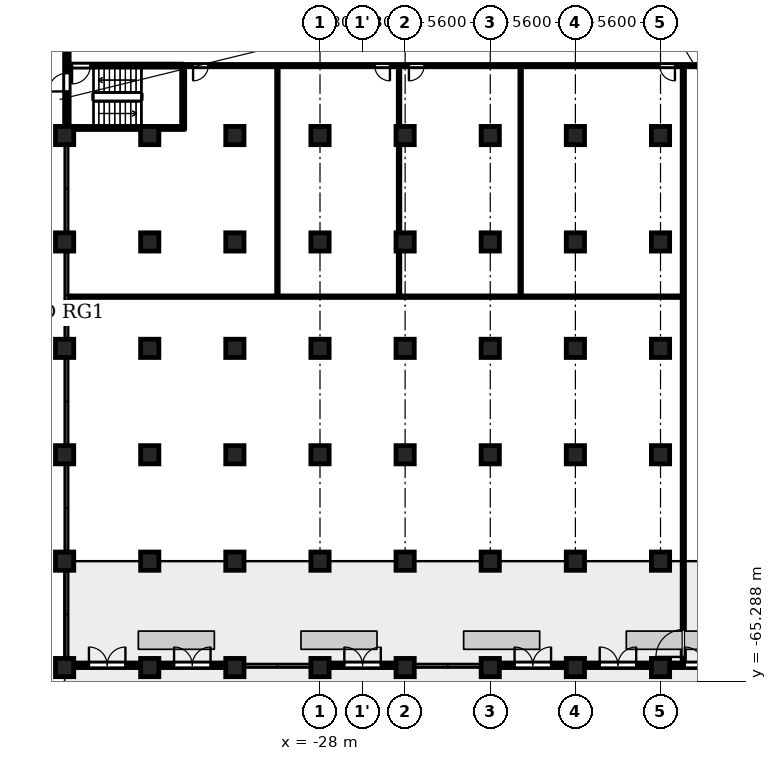
"""IFC4 building model, lengths in metres.
Left out: names, types, materials, properties, quantities, classifications, styles, units other than length and angle.
Written with IfcOpenShell. Run it as: python <this file> out.ifc"""

import sys

from ifc_helpers import new_model, si_unit, direction, frame, frame_2d, origin, origin_2d, place, context, subcontext, project, spatial, rectangle, circle, extrude, element, fill, save


model = new_model("IFC4")
c1 = context("Model", 3, precision=1e-05, world=origin(), true_north=direction((0.0, 1.0)))
c2 = subcontext(c1, "Body", "Model", "MODEL_VIEW")
j1 = project(units=[si_unit("LENGTHUNIT", "METRE"), si_unit("PLANEANGLEUNIT", "RADIAN")], contexts=[c1])
p1 = place(None, origin())
s1 = spatial("IfcSite", under=j1, at=p1, CompositionType="ELEMENT")
p2 = place(p1, origin())
s2 = spatial("IfcBuilding", under=s1, at=p2, CompositionType="ELEMENT")
p3 = place(p2, origin())
s3 = spatial("IfcBuildingStorey", under=s2, at=p3, CompositionType="ELEMENT", Elevation=0.0)
for number, where, z_axis, x_axis in (
    (1, (-44.8, -29.4, 0.0), (0.0, 0.0, 1.0), (1.0, 0.0, 0.0)),
    (2, (-39.2, -29.4, 0.0), (0.0, 0.0, 1.0), (1.0, 0.0, 0.0)),
    (3, (-33.6, -29.4, 0.0), (0.0, 0.0, 1.0), (1.0, 0.0, 0.0)),
    (4, (-28.0, -29.4, 0.0), (0.0, 0.0, 1.0), (1.0, 0.0, 0.0)),
    (5, (-22.4, -29.4, 0.0), (0.0, 0.0, 1.0), (1.0, 0.0, 0.0)),
    (6, (-16.8, -29.4, 0.0), (0.0, 0.0, 1.0), (1.0, 0.0, 0.0)),
    (7, (-11.2, -29.4, 0.0), (0.0, 0.0, 1.0), (1.0, 0.0, 0.0)),
    (8, (-5.6, -29.4, 0.0), (0.0, 0.0, 1.0), (1.0, 0.0, 0.0)),
    (9, (-44.8, -36.4, 0.0), (0.0, 0.0, 1.0), (1.0, 0.0, 0.0)),
    (10, (-39.2, -36.4, 0.0), (0.0, 0.0, 1.0), (1.0, 0.0, 0.0)),
    (11, (-33.6, -36.4, 0.0), (0.0, 0.0, 1.0), (1.0, 0.0, 0.0)),
    (12, (-28.0, -36.4, 0.0), (0.0, 0.0, 1.0), (1.0, 0.0, 0.0)),
    (13, (-22.4, -36.4, 0.0), (0.0, 0.0, 1.0), (1.0, 0.0, 0.0)),
    (14, (-16.8, -36.4, 0.0), (0.0, 0.0, 1.0), (1.0, 0.0, 0.0)),
    (15, (-11.2, -36.4, 0.0), (0.0, 0.0, 1.0), (1.0, 0.0, 0.0)),
    (16, (-5.6, -36.4, 0.0), (0.0, 0.0, 1.0), (1.0, 0.0, 0.0)),
    (17, (-44.8, -43.4, 0.0), (0.0, 0.0, 1.0), (1.0, 0.0, 0.0)),
    (18, (-39.2, -43.4, 0.0), (0.0, 0.0, 1.0), (1.0, 0.0, 0.0)),
    (19, (-33.6, -43.4, 0.0), (0.0, 0.0, 1.0), (1.0, 0.0, 0.0)),
    (20, (-28.0, -43.4, 0.0), (0.0, 0.0, 1.0), (1.0, 0.0, 0.0)),
    (21, (-22.4, -43.4, 0.0), (0.0, 0.0, 1.0), (1.0, 0.0, 0.0)),
    (22, (-16.8, -43.4, 0.0), (0.0, 0.0, 1.0), (1.0, 0.0, 0.0)),
    (23, (-11.2, -43.4, 0.0), (0.0, 0.0, 1.0), (1.0, 0.0, 0.0)),
    (24, (-5.6, -43.4, 0.0), (0.0, 0.0, 1.0), (1.0, 0.0, 0.0)),
    (25, (-44.8, -50.4, 0.0), (0.0, 0.0, 1.0), (1.0, 0.0, 0.0)),
    (26, (-39.2, -50.4, 0.0), (0.0, 0.0, 1.0), (1.0, 0.0, 0.0)),
    (27, (-33.6, -50.4, 0.0), (0.0, 0.0, 1.0), (1.0, 0.0, 0.0)),
    (28, (-28.0, -50.4, 0.0), (0.0, 0.0, 1.0), (1.0, 0.0, 0.0)),
    (29, (-22.4, -50.4, 0.0), (0.0, 0.0, 1.0), (1.0, 0.0, 0.0)),
    (30, (-16.8, -50.4, 0.0), (0.0, 0.0, 1.0), (1.0, 0.0, 0.0)),
    (31, (-11.2, -50.4, 0.0), (0.0, 0.0, 1.0), (1.0, 0.0, 0.0)),
    (32, (-5.6, -50.4, 0.0), (0.0, 0.0, 1.0), (1.0, 0.0, 0.0)),
    (33, (-44.8, -57.4, 0.0), (0.0, 0.0, 1.0), (1.0, 0.0, 0.0)),
    (34, (-39.2, -57.4, 0.0), (0.0, 0.0, 1.0), (1.0, 0.0, 0.0)),
    (35, (-33.6, -57.4, 0.0), (0.0, 0.0, 1.0), (1.0, 0.0, 0.0)),
    (36, (-28.0, -57.4, 0.0), (0.0, 0.0, 1.0), (1.0, 0.0, 0.0)),
    (37, (-22.4, -57.4, 0.0), (0.0, 0.0, 1.0), (1.0, 0.0, 0.0)),
    (38, (-16.8, -57.4, 0.0), (0.0, 0.0, 1.0), (1.0, 0.0, 0.0)),
    (39, (-11.2, -57.4, 0.0), (0.0, 0.0, 1.0), (1.0, 0.0, 0.0)),
    (40, (-5.6, -57.4, 0.0), (0.0, 0.0, 1.0), (1.0, 0.0, 0.0)),
    (41, (-44.8, -64.4, 0.0), (0.0, 0.0, 1.0), (1.0, 0.0, 0.0)),
    (42, (-39.2, -64.4, 0.0), (0.0, 0.0, 1.0), (1.0, 0.0, 0.0)),
    (43, (-33.6, -64.4, 0.0), (0.0, 0.0, 1.0), (1.0, 0.0, 0.0)),
    (44, (-28.0, -64.4, 0.0), (0.0, 0.0, 1.0), (1.0, 0.0, 0.0)),
    (45, (-22.4, -64.4, 0.0), (0.0, 0.0, 1.0), (1.0, 0.0, 0.0)),
    (46, (-16.8, -64.4, 0.0), (0.0, 0.0, 1.0), (1.0, 0.0, 0.0)),
    (47, (-11.2, -64.4, 0.0), (0.0, 0.0, 1.0), (1.0, 0.0, 0.0)),
    (48, (-5.6, -64.4, 0.0), (0.0, 0.0, 1.0), (1.0, 0.0, 0.0)),
):
    element("IfcColumn", number, at=place(p3, frame(where, z_axis=z_axis, x_axis=x_axis)), inside=s3, PredefinedType="COLUMN", context=c2, shape_type="SweptSolid", body=[
        extrude(circle(Radius=0.6, at=origin_2d()), origin(), (0.0, 0.0, 1.0), 6.5),
    ])
p4 = place(p3, frame((-44.65, -28.8, 0.0), z_axis=(0.0, 0.0, 1.0), x_axis=(0.0, 1.0, 0.0)))
e49 = element("IfcWall", 49, at=p4, inside=s3, PredefinedType="SOLIDWALL", context=c2, shape_type="SweptSolid", body=[
    extrude(rectangle(XDim=5.8, YDim=0.3, at=frame_2d((2.9, 0.0))), origin(), (0.0, 0.0, 1.0), 5.35),
])
p5 = place(p4, frame((2.3, 0.0, 0.0)))
e50 = element("IfcOpeningElement", 50, at=p5, cuts=e49, PredefinedType="OPENING", context=c2, shape_type="SweptSolid", body=[
    extrude(rectangle(XDim=1.2, YDim=2.1, at=frame_2d((0.6, 1.05))), frame((0.0, 0.16, 0.0), z_axis=(0.0, -1.0, 0.0), x_axis=(1.0, 0.0, 0.0)), (0.0, 0.0, 1.0), 0.32),
])
p6 = place(p3, frame((-44.2, -64.25, 0.0), z_axis=(0.0, 0.0, 1.0), x_axis=(1.0, 0.0, 0.0)))
e51 = element("IfcWall", 51, at=p6, inside=s3, PredefinedType="SOLIDWALL", context=c2, shape_type="SweptSolid", body=[
    extrude(rectangle(XDim=4.4, YDim=0.3, at=frame_2d((2.2, 0.0))), origin(), (0.0, 0.0, 1.0), 5.35),
])
p7 = place(p6, frame((1.0, 0.0, 0.0)))
e52 = element("IfcOpeningElement", 52, at=p7, cuts=e51, PredefinedType="OPENING", context=c2, shape_type="SweptSolid", body=[
    extrude(rectangle(XDim=2.4, YDim=2.4, at=frame_2d((1.2, 1.2))), frame((0.0, 0.16, 0.0), z_axis=(0.0, -1.0, 0.0), x_axis=(1.0, 0.0, 0.0)), (0.0, 0.0, 1.0), 0.32),
])
p8 = place(p3, frame((-38.6, -64.25, 0.0), z_axis=(0.0, 0.0, 1.0), x_axis=(1.0, 0.0, 0.0)))
e53 = element("IfcWall", 53, at=p8, inside=s3, PredefinedType="SOLIDWALL", context=c2, shape_type="SweptSolid", body=[
    extrude(rectangle(XDim=4.4, YDim=0.3, at=frame_2d((2.2, 0.0))), origin(), (0.0, 0.0, 1.0), 5.35),
])
p9 = place(p8, frame((1.0, 0.0, 0.0)))
e54 = element("IfcOpeningElement", 54, at=p9, cuts=e53, PredefinedType="OPENING", context=c2, shape_type="SweptSolid", body=[
    extrude(rectangle(XDim=2.4, YDim=2.4, at=frame_2d((1.2, 1.2))), frame((0.0, 0.16, 0.0), z_axis=(0.0, -1.0, 0.0), x_axis=(1.0, 0.0, 0.0)), (0.0, 0.0, 1.0), 0.32),
])
p10 = place(p3, frame((-27.4, -64.25, 0.0), z_axis=(0.0, 0.0, 1.0), x_axis=(1.0, 0.0, 0.0)))
e55 = element("IfcWall", 55, at=p10, inside=s3, PredefinedType="SOLIDWALL", context=c2, shape_type="SweptSolid", body=[
    extrude(rectangle(XDim=4.4, YDim=0.3, at=frame_2d((2.2, 0.0))), origin(), (0.0, 0.0, 1.0), 5.35),
])
p11 = place(p10, frame((1.0, 0.0, 0.0)))
e56 = element("IfcOpeningElement", 56, at=p11, cuts=e55, PredefinedType="OPENING", context=c2, shape_type="SweptSolid", body=[
    extrude(rectangle(XDim=2.4, YDim=2.4, at=frame_2d((1.2, 1.2))), frame((0.0, 0.16, 0.0), z_axis=(0.0, -1.0, 0.0), x_axis=(1.0, 0.0, 0.0)), (0.0, 0.0, 1.0), 0.32),
])
p12 = place(p3, frame((-16.2, -64.25, 0.0), z_axis=(0.0, 0.0, 1.0), x_axis=(1.0, 0.0, 0.0)))
e57 = element("IfcWall", 57, at=p12, inside=s3, PredefinedType="SOLIDWALL", context=c2, shape_type="SweptSolid", body=[
    extrude(rectangle(XDim=4.4, YDim=0.3, at=frame_2d((2.2, 0.0))), origin(), (0.0, 0.0, 1.0), 5.35),
])
p13 = place(p12, frame((1.0, 0.0, 0.0)))
e58 = element("IfcOpeningElement", 58, at=p13, cuts=e57, PredefinedType="OPENING", context=c2, shape_type="SweptSolid", body=[
    extrude(rectangle(XDim=2.4, YDim=2.4, at=frame_2d((1.2, 1.2))), frame((0.0, 0.16, 0.0), z_axis=(0.0, -1.0, 0.0), x_axis=(1.0, 0.0, 0.0)), (0.0, 0.0, 1.0), 0.32),
])
p14 = place(p3, frame((-10.6, -64.25, 0.0), z_axis=(0.0, 0.0, 1.0), x_axis=(1.0, 0.0, 0.0)))
e59 = element("IfcWall", 59, at=p14, inside=s3, PredefinedType="SOLIDWALL", context=c2, shape_type="SweptSolid", body=[
    extrude(rectangle(XDim=4.4, YDim=0.3, at=frame_2d((2.2, 0.0))), origin(), (0.0, 0.0, 1.0), 5.35),
])
p15 = place(p14, frame((1.0, 0.0, 0.0)))
e60 = element("IfcOpeningElement", 60, at=p15, cuts=e59, PredefinedType="OPENING", context=c2, shape_type="SweptSolid", body=[
    extrude(rectangle(XDim=2.4, YDim=2.4, at=frame_2d((1.2, 1.2))), frame((0.0, 0.16, 0.0), z_axis=(0.0, -1.0, 0.0), x_axis=(1.0, 0.0, 0.0)), (0.0, 0.0, 1.0), 0.32),
])
p16 = place(p3, frame((-5.0, -64.25, 0.0), z_axis=(0.0, 0.0, 1.0), x_axis=(1.0, 0.0, 0.0)))
e61 = element("IfcWall", 61, at=p16, inside=s3, PredefinedType="SOLIDWALL", context=c2, shape_type="SweptSolid", body=[
    extrude(rectangle(XDim=4.4, YDim=0.3, at=frame_2d((2.2, 0.0))), origin(), (0.0, 0.0, 1.0), 5.35),
])
p17 = place(p16, frame((1.0, 0.0, 0.0)))
e62 = element("IfcOpeningElement", 62, at=p17, cuts=e61, PredefinedType="OPENING", context=c2, shape_type="SweptSolid", body=[
    extrude(rectangle(XDim=2.4, YDim=2.4, at=frame_2d((1.2, 1.2))), frame((0.0, 0.16, 0.0), z_axis=(0.0, -1.0, 0.0), x_axis=(1.0, 0.0, 0.0)), (0.0, 0.0, 1.0), 0.32),
])
p18 = place(p3, frame((-44.618, -40.0, 0.0), z_axis=(0.0, 0.0, 1.0), x_axis=(1.0, 0.0, 0.0)))
e63 = element("IfcWall", 63, at=p18, inside=s3, PredefinedType="PARTITIONING", context=c2, shape_type="SweptSolid", body=[
    extrude(rectangle(XDim=40.443, YDim=0.1, at=frame_2d((20.221, 0.0))), origin(), (0.0, 0.0, 1.0), 6.15),
])
p19 = place(p3, frame((-44.71, -28.9, 0.0), z_axis=(0.0, 0.0, 1.0), x_axis=(1.0, 0.0, 0.0)))
e64 = element("IfcWall", 64, at=p19, inside=s3, PredefinedType="SHEAR", context=c2, shape_type="SweptSolid", body=[
    extrude(rectangle(XDim=7.81, YDim=0.2, at=frame_2d((3.905, 0.0))), origin(), (0.0, 0.0, 1.0), 6.15),
])
p20 = place(p3, frame((-37.0, -24.8, 0.0), z_axis=(0.0, 0.0, 1.0), x_axis=(1.0, 0.0, 0.0)))
e65 = element("IfcWall", 65, at=p20, inside=s3, PredefinedType="PARTITIONING", context=c2, shape_type="SweptSolid", body=[
    extrude(rectangle(XDim=34.95, YDim=0.15, at=frame_2d((17.475, 0.0))), origin(), (0.0, 0.0, 1.0), 6.15),
])
p21 = place(p20, frame((0.65, 0.0, 0.0)))
e66 = element("IfcOpeningElement", 66, at=p21, cuts=e65, PredefinedType="OPENING", context=c2, shape_type="SweptSolid", body=[
    extrude(rectangle(XDim=1.0, YDim=2.1, at=frame_2d((0.5, 1.05))), frame((0.0, 0.085, 0.0), z_axis=(0.0, -1.0, 0.0), x_axis=(1.0, 0.0, 0.0)), (0.0, 0.0, 1.0), 0.17),
])
p22 = place(p20, frame((12.6, 0.0, 0.0)))
e67 = element("IfcOpeningElement", 67, at=p22, cuts=e65, PredefinedType="OPENING", context=c2, shape_type="SweptSolid", body=[
    extrude(rectangle(XDim=1.0, YDim=2.1, at=frame_2d((0.5, 1.05))), frame((0.0, 0.085, 0.0), z_axis=(0.0, -1.0, 0.0), x_axis=(1.0, 0.0, 0.0)), (0.0, 0.0, 1.0), 0.17),
])
p23 = place(p20, frame((14.85, 0.0, 0.0)))
e68 = element("IfcOpeningElement", 68, at=p23, cuts=e65, PredefinedType="OPENING", context=c2, shape_type="SweptSolid", body=[
    extrude(rectangle(XDim=1.0, YDim=2.1, at=frame_2d((0.5, 1.05))), frame((0.0, 0.085, 0.0), z_axis=(0.0, -1.0, 0.0), x_axis=(1.0, 0.0, 0.0)), (0.0, 0.0, 1.0), 0.17),
])
p24 = place(p20, frame((31.35, 0.0, 0.0)))
e69 = element("IfcOpeningElement", 69, at=p24, cuts=e65, PredefinedType="OPENING", context=c2, shape_type="SweptSolid", body=[
    extrude(rectangle(XDim=1.0, YDim=2.1, at=frame_2d((0.5, 1.05))), frame((0.0, 0.085, 0.0), z_axis=(0.0, -1.0, 0.0), x_axis=(1.0, 0.0, 0.0)), (0.0, 0.0, 1.0), 0.17),
])
p25 = place(p3, frame((-44.71, -24.8, 0.0), z_axis=(0.0, 0.0, 1.0), x_axis=(1.0, 0.0, 0.0)))
e70 = element("IfcWall", 70, at=p25, inside=s3, PredefinedType="SHEAR", context=c2, shape_type="SweptSolid", body=[
    extrude(rectangle(XDim=7.71, YDim=0.2, at=frame_2d((3.855, 0.0))), origin(), (0.0, 0.0, 1.0), 6.15),
])
p26 = place(p25, frame((0.4, 0.0, 0.0)))
e71 = element("IfcOpeningElement", 71, at=p26, cuts=e70, PredefinedType="OPENING", context=c2, shape_type="SweptSolid", body=[
    extrude(rectangle(XDim=1.2, YDim=2.1, at=frame_2d((0.6, 1.05))), frame((0.0, 0.11, 0.0), z_axis=(0.0, -1.0, 0.0), x_axis=(1.0, 0.0, 0.0)), (0.0, 0.0, 1.0), 0.22),
])
p27 = place(p3, frame((-37.0, -28.8, 0.0), z_axis=(0.0, 0.0, 1.0), x_axis=(0.0, 1.0, 0.0)))
e72 = element("IfcWall", 72, at=p27, inside=s3, PredefinedType="SHEAR", context=c2, shape_type="SweptSolid", body=[
    extrude(rectangle(XDim=3.925, YDim=0.2, at=frame_2d((1.962, 0.0))), origin(), (0.0, 0.0, 1.0), 6.15),
])
for number, where, z_axis, x_axis in (
    (73, (-30.8, -39.95, 0.0), (0.0, 0.0, 1.0), (0.0, 1.0, 0.0)),
    (74, (-22.8, -39.95, 0.0), (0.0, 0.0, 1.0), (0.0, 1.0, 0.0)),
    (75, (-14.8, -39.95, 0.0), (0.0, 0.0, 1.0), (0.0, 1.0, 0.0)),
):
    element("IfcWall", number, at=place(p3, frame(where, z_axis=z_axis, x_axis=x_axis)), inside=s3, PredefinedType="PARTITIONING", context=c2, shape_type="SweptSolid", body=[
        extrude(rectangle(XDim=15.075, YDim=0.1, at=frame_2d((7.538, 0.0))), origin(), (0.0, 0.0, 1.0), 6.15),
    ])
p28 = place(p3, frame((-4.1, -64.08, 0.0), z_axis=(0.0, 0.0, 1.0), x_axis=(0.0, 1.0, 0.0)))
e76 = element("IfcWall", 76, at=p28, inside=s3, PredefinedType="PARTITIONING", context=c2, shape_type="SweptSolid", body=[
    extrude(rectangle(XDim=39.205, YDim=0.15, at=frame_2d((19.603, 0.0))), origin(), (0.0, 0.0, 1.0), 6.15),
])
p29 = place(p28, frame((0.38, 0.0, 0.0)))
e77 = element("IfcOpeningElement", 77, at=p29, cuts=e76, PredefinedType="OPENING", context=c2, shape_type="SweptSolid", body=[
    extrude(rectangle(XDim=1.8, YDim=2.1, at=frame_2d((0.9, 1.05))), frame((0.0, 0.085, 0.0), z_axis=(0.0, -1.0, 0.0), x_axis=(1.0, 0.0, 0.0)), (0.0, 0.0, 1.0), 0.17),
])
p30 = place(p5, origin())
e78 = element("IfcDoor", 78, at=p30, inside=s3, OperationType="SINGLE_SWING_LEFT", PredefinedType="DOOR", context=c2, shape_type="SweptSolid", body=[
    extrude(rectangle(XDim=1.2, YDim=2.1, at=frame_2d((0.6, 1.05))), frame((0.0, 0.025, 0.0), z_axis=(0.0, -1.0, 0.0), x_axis=(1.0, 0.0, 0.0)), (0.0, 0.0, 1.0), 0.05),
])
fill(e50, e78)
p31 = place(p7, origin())
e79 = element("IfcDoor", 79, at=p31, inside=s3, OperationType="SINGLE_SWING_LEFT", PredefinedType="DOOR", context=c2, shape_type="SweptSolid", body=[
    extrude(rectangle(XDim=2.4, YDim=2.4, at=frame_2d((1.2, 1.2))), frame((0.0, 0.025, 0.0), z_axis=(0.0, -1.0, 0.0), x_axis=(1.0, 0.0, 0.0)), (0.0, 0.0, 1.0), 0.05),
])
fill(e52, e79)
p32 = place(p9, origin())
e80 = element("IfcDoor", 80, at=p32, inside=s3, OperationType="SINGLE_SWING_LEFT", PredefinedType="DOOR", context=c2, shape_type="SweptSolid", body=[
    extrude(rectangle(XDim=2.4, YDim=2.4, at=frame_2d((1.2, 1.2))), frame((0.0, 0.025, 0.0), z_axis=(0.0, -1.0, 0.0), x_axis=(1.0, 0.0, 0.0)), (0.0, 0.0, 1.0), 0.05),
])
fill(e54, e80)
p33 = place(p11, origin())
e81 = element("IfcDoor", 81, at=p33, inside=s3, OperationType="SINGLE_SWING_LEFT", PredefinedType="DOOR", context=c2, shape_type="SweptSolid", body=[
    extrude(rectangle(XDim=2.4, YDim=2.4, at=frame_2d((1.2, 1.2))), frame((0.0, 0.025, 0.0), z_axis=(0.0, -1.0, 0.0), x_axis=(1.0, 0.0, 0.0)), (0.0, 0.0, 1.0), 0.05),
])
fill(e56, e81)
p34 = place(p13, origin())
e82 = element("IfcDoor", 82, at=p34, inside=s3, OperationType="SINGLE_SWING_LEFT", PredefinedType="DOOR", context=c2, shape_type="SweptSolid", body=[
    extrude(rectangle(XDim=2.4, YDim=2.4, at=frame_2d((1.2, 1.2))), frame((0.0, 0.025, 0.0), z_axis=(0.0, -1.0, 0.0), x_axis=(1.0, 0.0, 0.0)), (0.0, 0.0, 1.0), 0.05),
])
fill(e58, e82)
p35 = place(p15, origin())
e83 = element("IfcDoor", 83, at=p35, inside=s3, OperationType="SINGLE_SWING_LEFT", PredefinedType="DOOR", context=c2, shape_type="SweptSolid", body=[
    extrude(rectangle(XDim=2.4, YDim=2.4, at=frame_2d((1.2, 1.2))), frame((0.0, 0.025, 0.0), z_axis=(0.0, -1.0, 0.0), x_axis=(1.0, 0.0, 0.0)), (0.0, 0.0, 1.0), 0.05),
])
fill(e60, e83)
p36 = place(p17, origin())
e84 = element("IfcDoor", 84, at=p36, inside=s3, OperationType="SINGLE_SWING_LEFT", PredefinedType="DOOR", context=c2, shape_type="SweptSolid", body=[
    extrude(rectangle(XDim=2.4, YDim=2.4, at=frame_2d((1.2, 1.2))), frame((0.0, 0.025, 0.0), z_axis=(0.0, -1.0, 0.0), x_axis=(1.0, 0.0, 0.0)), (0.0, 0.0, 1.0), 0.05),
])
fill(e62, e84)
p37 = place(p26, origin())
e85 = element("IfcDoor", 85, at=p37, inside=s3, OperationType="SINGLE_SWING_LEFT", PredefinedType="DOOR", context=c2, shape_type="SweptSolid", body=[
    extrude(rectangle(XDim=1.2, YDim=2.1, at=frame_2d((0.6, 1.05))), frame((0.0, 0.025, 0.0), z_axis=(0.0, -1.0, 0.0), x_axis=(1.0, 0.0, 0.0)), (0.0, 0.0, 1.0), 0.05),
])
fill(e71, e85)
p38 = place(p29, origin())
e86 = element("IfcDoor", 86, at=p38, inside=s3, OperationType="SINGLE_SWING_RIGHT", PredefinedType="DOOR", context=c2, shape_type="SweptSolid", body=[
    extrude(rectangle(XDim=1.8, YDim=2.1, at=frame_2d((0.9, 1.05))), frame((0.0, 0.025, 0.0), z_axis=(0.0, -1.0, 0.0), x_axis=(1.0, 0.0, 0.0)), (0.0, 0.0, 1.0), 0.05),
])
fill(e77, e86)
p39 = place(p21, origin())
e87 = element("IfcDoor", 87, at=p39, inside=s3, OperationType="SINGLE_SWING_LEFT", PredefinedType="DOOR", context=c2, shape_type="SweptSolid", body=[
    extrude(rectangle(XDim=1.0, YDim=2.1, at=frame_2d((0.5, 1.05))), frame((0.0, 0.025, 0.0), z_axis=(0.0, -1.0, 0.0), x_axis=(1.0, 0.0, 0.0)), (0.0, 0.0, 1.0), 0.05),
])
fill(e66, e87)
p40 = place(p22, origin())
e88 = element("IfcDoor", 88, at=p40, inside=s3, OperationType="SINGLE_SWING_RIGHT", PredefinedType="DOOR", context=c2, shape_type="SweptSolid", body=[
    extrude(rectangle(XDim=1.0, YDim=2.1, at=frame_2d((0.5, 1.05))), frame((0.0, 0.025, 0.0), z_axis=(0.0, -1.0, 0.0), x_axis=(1.0, 0.0, 0.0)), (0.0, 0.0, 1.0), 0.05),
])
fill(e67, e88)
p41 = place(p23, origin())
e89 = element("IfcDoor", 89, at=p41, inside=s3, OperationType="SINGLE_SWING_LEFT", PredefinedType="DOOR", context=c2, shape_type="SweptSolid", body=[
    extrude(rectangle(XDim=1.0, YDim=2.1, at=frame_2d((0.5, 1.05))), frame((0.0, 0.025, 0.0), z_axis=(0.0, -1.0, 0.0), x_axis=(1.0, 0.0, 0.0)), (0.0, 0.0, 1.0), 0.05),
])
fill(e68, e89)
p42 = place(p24, origin())
e90 = element("IfcDoor", 90, at=p42, inside=s3, OperationType="SINGLE_SWING_RIGHT", PredefinedType="DOOR", context=c2, shape_type="SweptSolid", body=[
    extrude(rectangle(XDim=1.0, YDim=2.1, at=frame_2d((0.5, 1.05))), frame((0.0, 0.025, 0.0), z_axis=(0.0, -1.0, 0.0), x_axis=(1.0, 0.0, 0.0)), (0.0, 0.0, 1.0), 0.05),
])
fill(e69, e90)
save(model, sys.argv[1])
